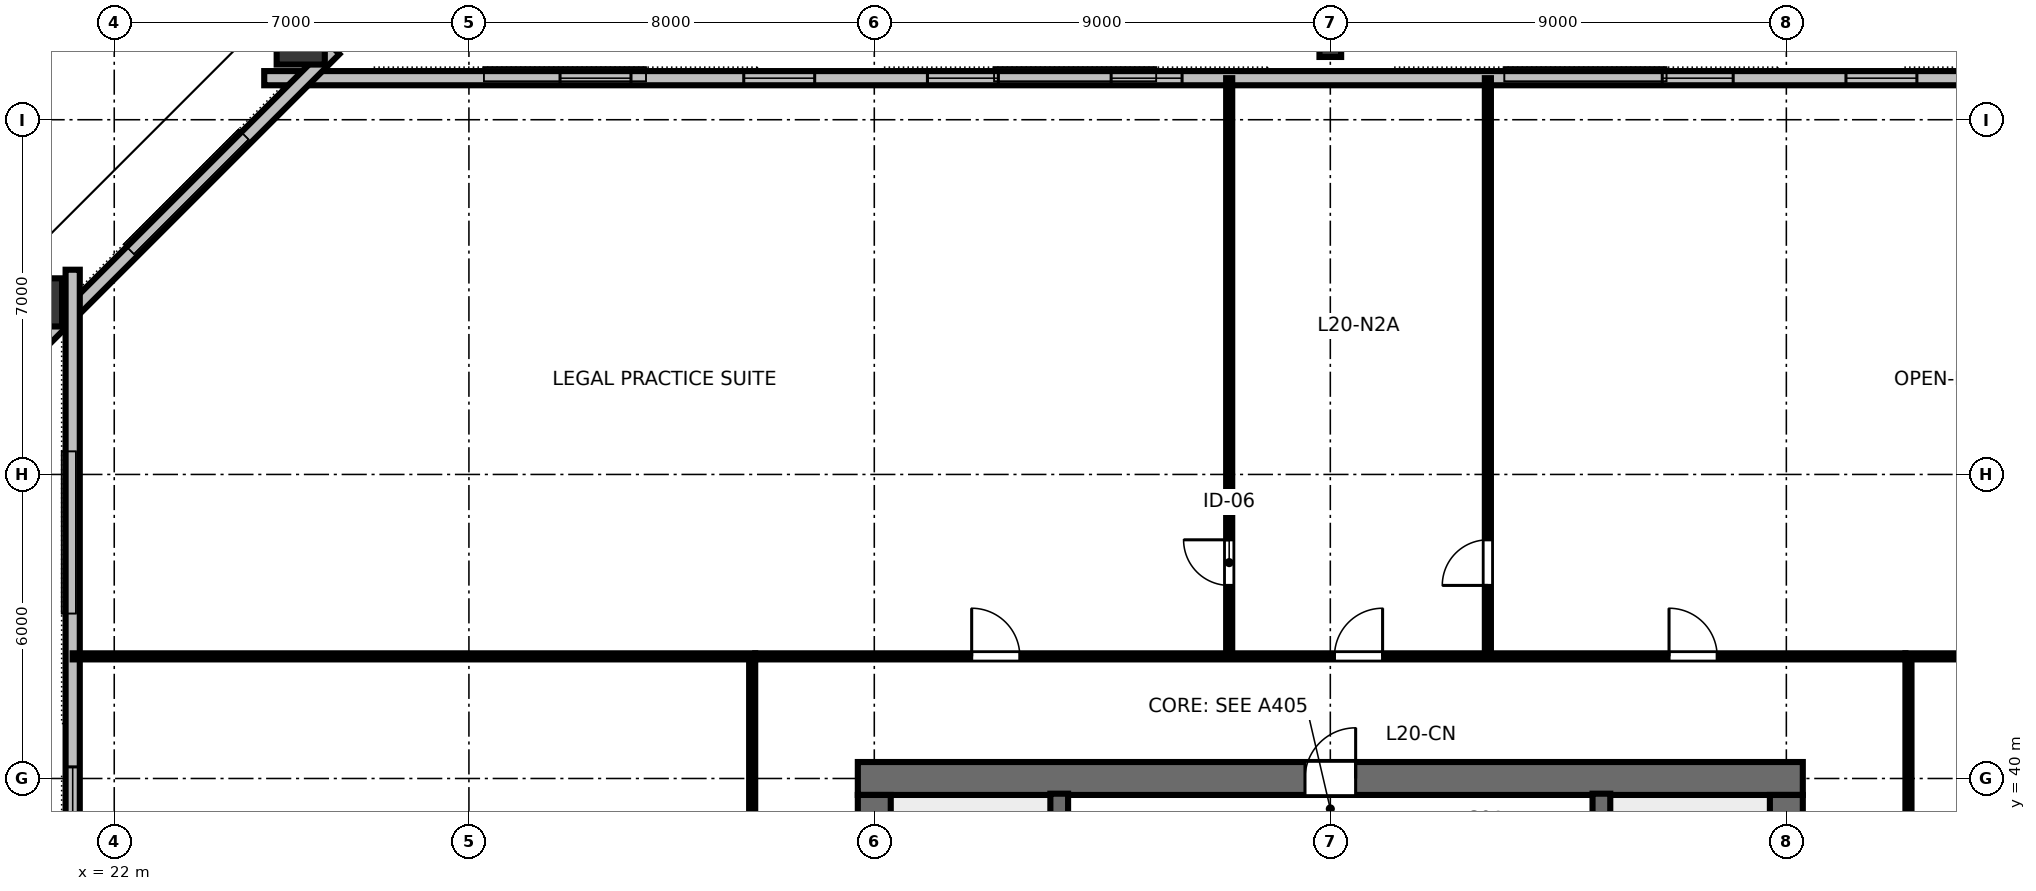
"""IFC4 building model, lengths in metres.
Left out: names, types, materials, properties, quantities, classifications, styles, units other than length and angle.
Written with IfcOpenShell. Run it as: python <this file> out.ifc"""

import sys

from ifc_helpers import new_model, si_unit, direction, frame, frame_2d, origin, origin_2d, place, context, subcontext, project, spatial, rectangle, hollow_rectangle, i_section, extrude, element, fill, save


model = new_model("IFC4")
c1 = context("Model", 3, precision=1e-05, world=origin(), true_north=direction((0.0, 1.0)))
c2 = subcontext(c1, "Body", "Model", "MODEL_VIEW")
j1 = project(units=[si_unit("LENGTHUNIT", "METRE"), si_unit("PLANEANGLEUNIT", "RADIAN")], contexts=[c1])
p1 = place(None, origin())
s1 = spatial("IfcSite", under=j1, at=p1, CompositionType="ELEMENT")
p2 = place(p1, origin())
s2 = spatial("IfcBuilding", under=s1, at=p2, CompositionType="ELEMENT")
p3 = place(p2, frame((0.0, 0.0, 78.4)))
s3 = spatial("IfcBuildingStorey", under=s2, at=p3, CompositionType="ELEMENT", Elevation=78.4)
p4 = place(p3, frame((36.675, 40.0, 0.0), z_axis=(0.0, 0.0, 1.0), x_axis=(1.0, 0.0, 0.0)))
e1 = element("IfcWall", 1, at=p4, inside=s3, PredefinedType="SHEAR", context=c2, shape_type="SweptSolid", body=[
    extrude(rectangle(XDim=18.65, YDim=0.65, at=frame_2d((9.325, 0.0))), origin(), (0.0, 0.0, 1.0), 3.36),
])
p5 = place(p4, frame((8.825, 0.0, 0.0)))
e2 = element("IfcOpeningElement", 2, at=p5, cuts=e1, PredefinedType="OPENING", context=c2, shape_type="SweptSolid", body=[
    extrude(rectangle(XDim=1.0, YDim=2.15, at=frame_2d((0.5, 1.075))), frame((0.0, 0.335, 0.0), z_axis=(0.0, -1.0, 0.0), x_axis=(1.0, 0.0, 0.0)), (0.0, 0.0, 1.0), 0.67),
])
p6 = place(p3, frame((37.0, 24.325, 0.0), z_axis=(0.0, 0.0, 1.0), x_axis=(0.0, 1.0, 0.0)))
e3 = element("IfcWall", 3, at=p6, inside=s3, PredefinedType="SHEAR", context=c2, shape_type="SweptSolid", body=[
    extrude(rectangle(XDim=15.35, YDim=0.65, at=frame_2d((7.675, 0.0))), origin(), (0.0, 0.0, 1.0), 3.36),
])
p7 = place(p6, frame((5.2, 0.0, 0.0)))
e4 = element("IfcOpeningElement", 4, at=p7, cuts=e3, PredefinedType="OPENING", context=c2, shape_type="SweptSolid", body=[
    extrude(rectangle(XDim=1.15, YDim=2.15, at=frame_2d((0.575, 1.075))), frame((0.0, 0.335, 0.0), z_axis=(0.0, -1.0, 0.0), x_axis=(1.0, 0.0, 0.0)), (0.0, 0.0, 1.0), 0.67),
])
p8 = place(p3, frame((55.0, 24.325, 0.0), z_axis=(0.0, 0.0, 1.0), x_axis=(0.0, 1.0, 0.0)))
e5 = element("IfcWall", 5, at=p8, inside=s3, PredefinedType="SHEAR", context=c2, shape_type="SweptSolid", body=[
    extrude(rectangle(XDim=15.35, YDim=0.65, at=frame_2d((7.675, 0.0))), origin(), (0.0, 0.0, 1.0), 3.36),
])
p9 = place(p8, frame((5.2, 0.0, 0.0)))
e6 = element("IfcOpeningElement", 6, at=p9, cuts=e5, PredefinedType="OPENING", context=c2, shape_type="SweptSolid", body=[
    extrude(rectangle(XDim=1.15, YDim=2.15, at=frame_2d((0.575, 1.075))), frame((0.0, 0.335, 0.0), z_axis=(0.0, -1.0, 0.0), x_axis=(1.0, 0.0, 0.0)), (0.0, 0.0, 1.0), 0.67),
])
p10 = place(p3, frame((46.0, 54.48, 0.0), z_axis=(0.0, -0.161641018094, 0.986849624446), x_axis=(1.0, 0.0, 0.0)))
e7 = element("IfcColumn", 7, at=p10, inside=s3, PredefinedType="COLUMN", context=c2, shape_type="SweptSolid", body=[
    extrude(i_section(OverallWidth=0.428, OverallDepth=0.483, WebThickness=0.051, FlangeThickness=0.082, FilletRadius=0.025, at=origin_2d()), origin(), (0.0, 0.0, 1.0), 3.403),
])
p11 = place(p3, frame((25.681, 54.664, 0.0), z_axis=(0.227706652534, -0.158346926777, 0.960768406627), x_axis=(0.570924282853, 0.821002718174, 0.0)))
e8 = element("IfcColumn", 8, at=p11, inside=s3, PredefinedType="COLUMN", context=c2, shape_type="SweptSolid", body=[
    extrude(hollow_rectangle(XDim=0.95, YDim=1.15, WallThickness=0.06, at=origin_2d()), origin(), (0.0, 0.0, 1.0), 3.495),
])
p12 = place(p3, frame((20.396, 49.396, 0.0), z_axis=(0.186998264307, -0.199376234682, 0.961915155401), x_axis=(-0.658048855079, 0.701607062764, 0.273348191525)))
e9 = element("IfcColumn", 9, at=p12, inside=s3, PredefinedType="COLUMN", context=c2, shape_type="SweptSolid", body=[
    extrude(hollow_rectangle(XDim=0.95, YDim=1.15, WallThickness=0.06, at=origin_2d()), origin(), (0.0, 0.0, 1.0), 3.491),
])
p13 = place(p3, frame((67.04, 53.82, 0.0), z_axis=(0.0, 0.0, 1.0), x_axis=(-1.0, 0.0, 0.0)))
e10 = element("IfcWall", 10, at=p13, inside=s3, PredefinedType="STANDARD", context=c2, shape_type="SweptSolid", body=[
    extrude(rectangle(XDim=42.08, YDim=0.28, at=frame_2d((21.04, 0.0))), origin(), (0.0, 0.0, 1.0), 2.662),
])
p14 = place(p13, frame((5.838, 0.0, 0.85)))
e11 = element("IfcOpeningElement", 11, at=p14, cuts=e10, PredefinedType="OPENING", context=c2, shape_type="SweptSolid", body=[
    extrude(rectangle(XDim=1.4, YDim=1.2, at=frame_2d((0.7, 0.6))), frame((0.0, 0.15, 0.0), z_axis=(0.0, -1.0, 0.0), x_axis=(1.0, 0.0, 0.0)), (0.0, 0.0, 1.0), 0.3),
])
p15 = place(p13, frame((9.464, 0.0, 0.85)))
e12 = element("IfcOpeningElement", 12, at=p15, cuts=e10, PredefinedType="OPENING", context=c2, shape_type="SweptSolid", body=[
    extrude(rectangle(XDim=1.4, YDim=1.2, at=frame_2d((0.7, 0.6))), frame((0.0, 0.15, 0.0), z_axis=(0.0, -1.0, 0.0), x_axis=(1.0, 0.0, 0.0)), (0.0, 0.0, 1.0), 0.3),
])
p16 = place(p13, frame((13.089, 0.0, 0.85)))
e13 = element("IfcOpeningElement", 13, at=p16, cuts=e10, PredefinedType="OPENING", context=c2, shape_type="SweptSolid", body=[
    extrude(rectangle(XDim=1.4, YDim=1.2, at=frame_2d((0.7, 0.6))), frame((0.0, 0.15, 0.0), z_axis=(0.0, -1.0, 0.0), x_axis=(1.0, 0.0, 0.0)), (0.0, 0.0, 1.0), 0.3),
])
p17 = place(p13, frame((23.966, 0.0, 0.85)))
e14 = element("IfcOpeningElement", 14, at=p17, cuts=e10, PredefinedType="OPENING", context=c2, shape_type="SweptSolid", body=[
    extrude(rectangle(XDim=1.4, YDim=1.2, at=frame_2d((0.7, 0.6))), frame((0.0, 0.15, 0.0), z_axis=(0.0, -1.0, 0.0), x_axis=(1.0, 0.0, 0.0)), (0.0, 0.0, 1.0), 0.3),
])
p18 = place(p13, frame((27.591, 0.0, 0.85)))
e15 = element("IfcOpeningElement", 15, at=p18, cuts=e10, PredefinedType="OPENING", context=c2, shape_type="SweptSolid", body=[
    extrude(rectangle(XDim=1.4, YDim=1.2, at=frame_2d((0.7, 0.6))), frame((0.0, 0.15, 0.0), z_axis=(0.0, -1.0, 0.0), x_axis=(1.0, 0.0, 0.0)), (0.0, 0.0, 1.0), 0.3),
])
p19 = place(p13, frame((31.216, 0.0, 0.85)))
e16 = element("IfcOpeningElement", 16, at=p19, cuts=e10, PredefinedType="OPENING", context=c2, shape_type="SweptSolid", body=[
    extrude(rectangle(XDim=1.4, YDim=1.2, at=frame_2d((0.7, 0.6))), frame((0.0, 0.15, 0.0), z_axis=(0.0, -1.0, 0.0), x_axis=(1.0, 0.0, 0.0)), (0.0, 0.0, 1.0), 0.3),
])
p20 = place(p13, frame((34.842, 0.0, 0.85)))
e17 = element("IfcOpeningElement", 17, at=p20, cuts=e10, PredefinedType="OPENING", context=c2, shape_type="SweptSolid", body=[
    extrude(rectangle(XDim=1.4, YDim=1.2, at=frame_2d((0.7, 0.6))), frame((0.0, 0.15, 0.0), z_axis=(0.0, -1.0, 0.0), x_axis=(1.0, 0.0, 0.0)), (0.0, 0.0, 1.0), 0.3),
])
p21 = place(p3, frame((26.345, 54.394, 0.0), z_axis=(0.0, 0.0, 1.0), x_axis=(-0.707106781187, -0.707106781187, 0.0)))
e18 = element("IfcWall", 18, at=p21, inside=s3, PredefinedType="STANDARD", context=c2, shape_type="SweptSolid", body=[
    extrude(rectangle(XDim=8.116, YDim=0.28, at=frame_2d((4.058, 0.0))), origin(), (0.0, 0.0, 1.0), 2.662),
])
p22 = place(p3, frame((21.18, 50.04, 0.0), z_axis=(0.0, 0.0, 1.0), x_axis=(0.0, -1.0, 0.0)))
e19 = element("IfcWall", 19, at=p22, inside=s3, PredefinedType="STANDARD", context=c2, shape_type="SweptSolid", body=[
    extrude(rectangle(XDim=36.08, YDim=0.28, at=frame_2d((18.04, 0.0))), origin(), (0.0, 0.0, 1.0), 2.662),
])
p23 = place(p22, frame((9.811, 0.0, 0.85)))
e20 = element("IfcOpeningElement", 20, at=p23, cuts=e19, PredefinedType="OPENING", context=c2, shape_type="SweptSolid", body=[
    extrude(rectangle(XDim=1.4, YDim=1.2, at=frame_2d((0.7, 0.6))), frame((0.0, 0.15, 0.0), z_axis=(0.0, -1.0, 0.0), x_axis=(1.0, 0.0, 0.0)), (0.0, 0.0, 1.0), 0.3),
])
p24 = place(p22, frame((13.576, 0.0, 0.85)))
e21 = element("IfcOpeningElement", 21, at=p24, cuts=e19, PredefinedType="OPENING", context=c2, shape_type="SweptSolid", body=[
    extrude(rectangle(XDim=1.4, YDim=1.2, at=frame_2d((0.7, 0.6))), frame((0.0, 0.15, 0.0), z_axis=(0.0, -1.0, 0.0), x_axis=(1.0, 0.0, 0.0)), (0.0, 0.0, 1.0), 0.3),
])
p25 = place(p22, frame((21.104, 0.0, 0.85)))
e22 = element("IfcOpeningElement", 22, at=p25, cuts=e19, PredefinedType="OPENING", context=c2, shape_type="SweptSolid", body=[
    extrude(rectangle(XDim=1.4, YDim=1.2, at=frame_2d((0.7, 0.6))), frame((0.0, 0.15, 0.0), z_axis=(0.0, -1.0, 0.0), x_axis=(1.0, 0.0, 0.0)), (0.0, 0.0, 1.0), 0.3),
])
p26 = place(p22, frame((24.869, 0.0, 0.85)))
e23 = element("IfcOpeningElement", 23, at=p26, cuts=e19, PredefinedType="OPENING", context=c2, shape_type="SweptSolid", body=[
    extrude(rectangle(XDim=1.4, YDim=1.2, at=frame_2d((0.7, 0.6))), frame((0.0, 0.15, 0.0), z_axis=(0.0, -1.0, 0.0), x_axis=(1.0, 0.0, 0.0)), (0.0, 0.0, 1.0), 0.3),
])
for number, where, z_axis, x_axis in (
    (24, (40.65, 32.0, 0.0), (0.0, 0.0, 1.0), (0.0, 1.0, 0.0)),
    (25, (51.35, 32.0, 0.0), (0.0, 0.0, 1.0), (0.0, 1.0, 0.0)),
):
    element("IfcWall", number, at=place(p3, frame(where, z_axis=z_axis, x_axis=x_axis)), inside=s3, PredefinedType="SHEAR", context=c2, shape_type="SweptSolid", body=[
        extrude(rectangle(XDim=7.7, YDim=0.35, at=frame_2d((3.85, 0.0))), origin(), (0.0, 0.0, 1.0), 3.6),
    ])
p27 = place(p3, frame((44.004, 42.41, 0.0), z_axis=(0.0, 0.0, 1.0), x_axis=(0.0, 1.0, 0.0)))
e26 = element("IfcWall", 26, at=p27, inside=s3, PredefinedType="PARTITIONING", context=c2, shape_type="SweptSolid", body=[
    extrude(rectangle(XDim=11.41, YDim=0.12, at=frame_2d((5.705, 0.0))), origin(), (0.0, 0.0, 1.0), 2.64),
])
p28 = place(p27, frame((1.4, 0.0, 0.0)))
e27 = element("IfcOpeningElement", 27, at=p28, cuts=e26, PredefinedType="OPENING", context=c2, shape_type="SweptSolid", body=[
    extrude(rectangle(XDim=0.9, YDim=2.15, at=frame_2d((0.45, 1.075))), frame((0.0, 0.07, 0.0), z_axis=(0.0, -1.0, 0.0), x_axis=(1.0, 0.0, 0.0)), (0.0, 0.0, 1.0), 0.14),
])
p29 = place(p3, frame((49.11, 42.41, 0.0), z_axis=(0.0, 0.0, 1.0), x_axis=(0.0, 1.0, 0.0)))
e28 = element("IfcWall", 28, at=p29, inside=s3, PredefinedType="PARTITIONING", context=c2, shape_type="SweptSolid", body=[
    extrude(rectangle(XDim=11.41, YDim=0.12, at=frame_2d((5.705, 0.0))), origin(), (0.0, 0.0, 1.0), 2.64),
])
p30 = place(p29, frame((1.4, 0.0, 0.0)))
e29 = element("IfcOpeningElement", 29, at=p30, cuts=e28, PredefinedType="OPENING", context=c2, shape_type="SweptSolid", body=[
    extrude(rectangle(XDim=0.9, YDim=2.15, at=frame_2d((0.45, 1.075))), frame((0.0, 0.07, 0.0), z_axis=(0.0, -1.0, 0.0), x_axis=(1.0, 0.0, 0.0)), (0.0, 0.0, 1.0), 0.14),
])
p31 = place(p3, frame((34.65, 42.41, 0.0), z_axis=(0.0, 0.0, 1.0), x_axis=(1.0, 0.0, 0.0)))
e30 = element("IfcWall", 30, at=p31, inside=s3, PredefinedType="PARTITIONING", context=c2, shape_type="SweptSolid", body=[
    extrude(rectangle(XDim=22.7, YDim=0.12, at=frame_2d((11.35, 0.0))), origin(), (0.0, 0.0, 1.0), 2.64),
])
p32 = place(p31, frame((4.272, 0.0, 0.0)))
e31 = element("IfcOpeningElement", 31, at=p32, cuts=e30, PredefinedType="OPENING", context=c2, shape_type="SweptSolid", body=[
    extrude(rectangle(XDim=0.95, YDim=2.15, at=frame_2d((0.475, 1.075))), frame((0.0, 0.07, 0.0), z_axis=(0.0, -1.0, 0.0), x_axis=(1.0, 0.0, 0.0)), (0.0, 0.0, 1.0), 0.14),
])
p33 = place(p31, frame((11.432, 0.0, 0.0)))
e32 = element("IfcOpeningElement", 32, at=p33, cuts=e30, PredefinedType="OPENING", context=c2, shape_type="SweptSolid", body=[
    extrude(rectangle(XDim=0.95, YDim=2.15, at=frame_2d((0.475, 1.075))), frame((0.0, 0.07, 0.0), z_axis=(0.0, -1.0, 0.0), x_axis=(1.0, 0.0, 0.0)), (0.0, 0.0, 1.0), 0.14),
])
p34 = place(p31, frame((18.035, 0.0, 0.0)))
e33 = element("IfcOpeningElement", 33, at=p34, cuts=e30, PredefinedType="OPENING", context=c2, shape_type="SweptSolid", body=[
    extrude(rectangle(XDim=0.95, YDim=2.15, at=frame_2d((0.475, 1.075))), frame((0.0, 0.07, 0.0), z_axis=(0.0, -1.0, 0.0), x_axis=(1.0, 0.0, 0.0)), (0.0, 0.0, 1.0), 0.14),
])
p35 = place(p3, frame((34.59, 21.65, 0.0), z_axis=(0.0, 0.0, 1.0), x_axis=(0.0, 1.0, 0.0)))
e34 = element("IfcWall", 34, at=p35, inside=s3, PredefinedType="PARTITIONING", context=c2, shape_type="SweptSolid", body=[
    extrude(rectangle(XDim=20.7, YDim=0.12, at=frame_2d((10.35, 0.0))), origin(), (0.0, 0.0, 1.0), 2.64),
])
p36 = place(p35, frame((2.105, 0.0, 0.0)))
e35 = element("IfcOpeningElement", 35, at=p36, cuts=e34, PredefinedType="OPENING", context=c2, shape_type="SweptSolid", body=[
    extrude(rectangle(XDim=0.95, YDim=2.15, at=frame_2d((0.475, 1.075))), frame((0.0, 0.07, 0.0), z_axis=(0.0, -1.0, 0.0), x_axis=(1.0, 0.0, 0.0)), (0.0, 0.0, 1.0), 0.14),
])
p37 = place(p35, frame((7.369, 0.0, 0.0)))
e36 = element("IfcOpeningElement", 36, at=p37, cuts=e34, PredefinedType="OPENING", context=c2, shape_type="SweptSolid", body=[
    extrude(rectangle(XDim=0.95, YDim=2.15, at=frame_2d((0.475, 1.075))), frame((0.0, 0.07, 0.0), z_axis=(0.0, -1.0, 0.0), x_axis=(1.0, 0.0, 0.0)), (0.0, 0.0, 1.0), 0.14),
])
p38 = place(p35, frame((15.139, 0.0, 0.0)))
e37 = element("IfcOpeningElement", 37, at=p38, cuts=e34, PredefinedType="OPENING", context=c2, shape_type="SweptSolid", body=[
    extrude(rectangle(XDim=0.95, YDim=2.15, at=frame_2d((0.475, 1.075))), frame((0.0, 0.07, 0.0), z_axis=(0.0, -1.0, 0.0), x_axis=(1.0, 0.0, 0.0)), (0.0, 0.0, 1.0), 0.14),
])
p39 = place(p3, frame((57.41, 21.65, 0.0), z_axis=(0.0, 0.0, 1.0), x_axis=(0.0, 1.0, 0.0)))
e38 = element("IfcWall", 38, at=p39, inside=s3, PredefinedType="PARTITIONING", context=c2, shape_type="SweptSolid", body=[
    extrude(rectangle(XDim=20.7, YDim=0.12, at=frame_2d((10.35, 0.0))), origin(), (0.0, 0.0, 1.0), 2.64),
])
p40 = place(p39, frame((4.931, 0.0, 0.0)))
e39 = element("IfcOpeningElement", 39, at=p40, cuts=e38, PredefinedType="OPENING", context=c2, shape_type="SweptSolid", body=[
    extrude(rectangle(XDim=0.95, YDim=2.15, at=frame_2d((0.475, 1.075))), frame((0.0, 0.07, 0.0), z_axis=(0.0, -1.0, 0.0), x_axis=(1.0, 0.0, 0.0)), (0.0, 0.0, 1.0), 0.14),
])
p41 = place(p39, frame((15.081, 0.0, 0.0)))
e40 = element("IfcOpeningElement", 40, at=p41, cuts=e38, PredefinedType="OPENING", context=c2, shape_type="SweptSolid", body=[
    extrude(rectangle(XDim=0.95, YDim=2.15, at=frame_2d((0.475, 1.075))), frame((0.0, 0.07, 0.0), z_axis=(0.0, -1.0, 0.0), x_axis=(1.0, 0.0, 0.0)), (0.0, 0.0, 1.0), 0.14),
])
for number, where, z_axis, x_axis in (
    (41, (34.65, 42.41, 0.0), (0.0, 0.0, 1.0), (-1.0, 0.0, 0.0)),
    (42, (57.35, 42.41, 0.0), (0.0, 0.0, 1.0), (1.0, 0.0, 0.0)),
):
    element("IfcWall", number, at=place(p3, frame(where, z_axis=z_axis, x_axis=x_axis)), inside=s3, PredefinedType="PARTITIONING", context=c2, shape_type="SweptSolid", body=[
        extrude(rectangle(XDim=13.47, YDim=0.12, at=frame_2d((6.735, 0.0))), origin(), (0.0, 0.0, 1.0), 2.64),
    ])
p42 = place(p15, origin())
e43 = element("IfcWindow", 43, at=p42, inside=s3, PartitioningType="SINGLE_PANEL", PredefinedType="WINDOW", context=c2, shape_type="SweptSolid", body=[
    extrude(rectangle(XDim=1.4, YDim=1.2, at=frame_2d((0.7, 0.6))), frame((0.0, 0.03, 0.0), z_axis=(0.0, -1.0, 0.0), x_axis=(1.0, 0.0, 0.0)), (0.0, 0.0, 1.0), 0.06),
])
fill(e12, e43)
p43 = place(p16, origin())
e44 = element("IfcWindow", 44, at=p43, inside=s3, PartitioningType="SINGLE_PANEL", PredefinedType="WINDOW", context=c2, shape_type="SweptSolid", body=[
    extrude(rectangle(XDim=1.4, YDim=1.2, at=frame_2d((0.7, 0.6))), frame((0.0, 0.03, 0.0), z_axis=(0.0, -1.0, 0.0), x_axis=(1.0, 0.0, 0.0)), (0.0, 0.0, 1.0), 0.06),
])
fill(e13, e44)
p44 = place(p17, origin())
e45 = element("IfcWindow", 45, at=p44, inside=s3, PartitioningType="SINGLE_PANEL", PredefinedType="WINDOW", context=c2, shape_type="SweptSolid", body=[
    extrude(rectangle(XDim=1.4, YDim=1.2, at=frame_2d((0.7, 0.6))), frame((0.0, 0.03, 0.0), z_axis=(0.0, -1.0, 0.0), x_axis=(1.0, 0.0, 0.0)), (0.0, 0.0, 1.0), 0.06),
])
fill(e14, e45)
p45 = place(p18, origin())
e46 = element("IfcWindow", 46, at=p45, inside=s3, PartitioningType="SINGLE_PANEL", PredefinedType="WINDOW", context=c2, shape_type="SweptSolid", body=[
    extrude(rectangle(XDim=1.4, YDim=1.2, at=frame_2d((0.7, 0.6))), frame((0.0, 0.03, 0.0), z_axis=(0.0, -1.0, 0.0), x_axis=(1.0, 0.0, 0.0)), (0.0, 0.0, 1.0), 0.06),
])
fill(e15, e46)
p46 = place(p19, origin())
e47 = element("IfcWindow", 47, at=p46, inside=s3, PartitioningType="SINGLE_PANEL", PredefinedType="WINDOW", context=c2, shape_type="SweptSolid", body=[
    extrude(rectangle(XDim=1.4, YDim=1.2, at=frame_2d((0.7, 0.6))), frame((0.0, 0.03, 0.0), z_axis=(0.0, -1.0, 0.0), x_axis=(1.0, 0.0, 0.0)), (0.0, 0.0, 1.0), 0.06),
])
fill(e16, e47)
p47 = place(p20, origin())
e48 = element("IfcWindow", 48, at=p47, inside=s3, PartitioningType="SINGLE_PANEL", PredefinedType="WINDOW", context=c2, shape_type="SweptSolid", body=[
    extrude(rectangle(XDim=1.4, YDim=1.2, at=frame_2d((0.7, 0.6))), frame((0.0, 0.03, 0.0), z_axis=(0.0, -1.0, 0.0), x_axis=(1.0, 0.0, 0.0)), (0.0, 0.0, 1.0), 0.06),
])
fill(e17, e48)
p48 = place(p23, origin())
e49 = element("IfcWindow", 49, at=p48, inside=s3, PartitioningType="SINGLE_PANEL", PredefinedType="WINDOW", context=c2, shape_type="SweptSolid", body=[
    extrude(rectangle(XDim=1.4, YDim=1.2, at=frame_2d((0.7, 0.6))), frame((0.0, 0.03, 0.0), z_axis=(0.0, -1.0, 0.0), x_axis=(1.0, 0.0, 0.0)), (0.0, 0.0, 1.0), 0.06),
])
fill(e20, e49)
p49 = place(p5, origin())
e50 = element("IfcDoor", 50, at=p49, inside=s3, OperationType="SINGLE_SWING_RIGHT", PredefinedType="DOOR", context=c2, shape_type="SweptSolid", body=[
    extrude(rectangle(XDim=1.0, YDim=2.15, at=frame_2d((0.5, 1.075))), frame((0.0, 0.025, 0.0), z_axis=(0.0, -1.0, 0.0), x_axis=(1.0, 0.0, 0.0)), (0.0, 0.0, 1.0), 0.05),
])
fill(e2, e50)
p50 = place(p28, origin())
e51 = element("IfcDoor", 51, at=p50, inside=s3, OperationType="SINGLE_SWING_RIGHT", PredefinedType="DOOR", context=c2, shape_type="SweptSolid", body=[
    extrude(rectangle(XDim=0.9, YDim=2.15, at=frame_2d((0.45, 1.075))), frame((0.0, 0.025, 0.0), z_axis=(0.0, -1.0, 0.0), x_axis=(1.0, 0.0, 0.0)), (0.0, 0.0, 1.0), 0.05),
])
fill(e27, e51)
p51 = place(p30, origin())
e52 = element("IfcDoor", 52, at=p51, inside=s3, OperationType="SINGLE_SWING_LEFT", PredefinedType="DOOR", context=c2, shape_type="SweptSolid", body=[
    extrude(rectangle(XDim=0.9, YDim=2.15, at=frame_2d((0.45, 1.075))), frame((0.0, 0.025, 0.0), z_axis=(0.0, -1.0, 0.0), x_axis=(1.0, 0.0, 0.0)), (0.0, 0.0, 1.0), 0.05),
])
fill(e29, e52)
p52 = place(p32, origin())
e53 = element("IfcDoor", 53, at=p52, inside=s3, OperationType="SINGLE_SWING_LEFT", PredefinedType="DOOR", context=c2, shape_type="SweptSolid", body=[
    extrude(rectangle(XDim=0.95, YDim=2.15, at=frame_2d((0.475, 1.075))), frame((0.0, 0.025, 0.0), z_axis=(0.0, -1.0, 0.0), x_axis=(1.0, 0.0, 0.0)), (0.0, 0.0, 1.0), 0.05),
])
fill(e31, e53)
p53 = place(p33, origin())
e54 = element("IfcDoor", 54, at=p53, inside=s3, OperationType="SINGLE_SWING_RIGHT", PredefinedType="DOOR", context=c2, shape_type="SweptSolid", body=[
    extrude(rectangle(XDim=0.95, YDim=2.15, at=frame_2d((0.475, 1.075))), frame((0.0, 0.025, 0.0), z_axis=(0.0, -1.0, 0.0), x_axis=(1.0, 0.0, 0.0)), (0.0, 0.0, 1.0), 0.05),
])
fill(e32, e54)
p54 = place(p34, origin())
e55 = element("IfcDoor", 55, at=p54, inside=s3, OperationType="SINGLE_SWING_LEFT", PredefinedType="DOOR", context=c2, shape_type="SweptSolid", body=[
    extrude(rectangle(XDim=0.95, YDim=2.15, at=frame_2d((0.475, 1.075))), frame((0.0, 0.025, 0.0), z_axis=(0.0, -1.0, 0.0), x_axis=(1.0, 0.0, 0.0)), (0.0, 0.0, 1.0), 0.05),
])
fill(e33, e55)
save(model, sys.argv[1])
